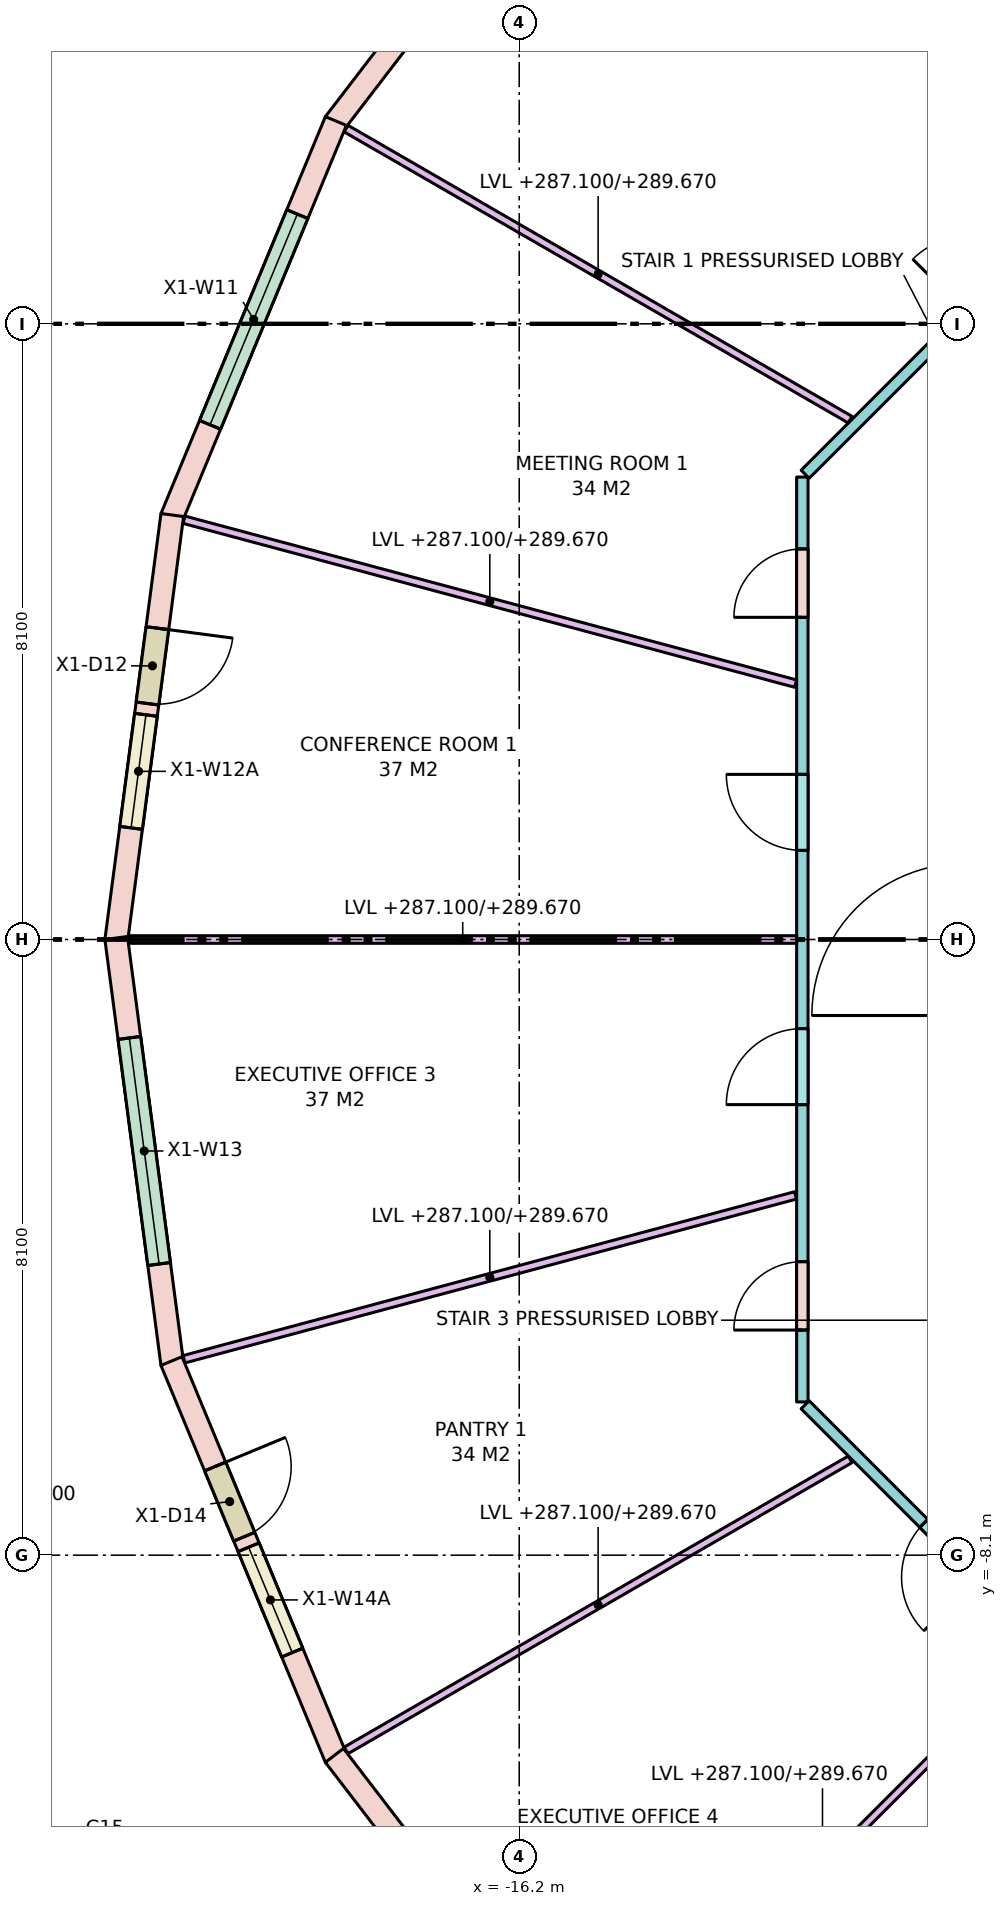
"""IFC4 building model, lengths in metres.
Left out: names, types, materials, properties, quantities, classifications, styles, units other than length and angle.
Written with IfcOpenShell. Run it as: python <this file> out.ifc"""

import sys

from ifc_helpers import new_model, si_unit, direction, frame, frame_2d, origin, place, context, subcontext, project, spatial, rectangle, extrude, element, fill, save


model = new_model("IFC4")
c1 = context("Model", 3, precision=1e-05, world=origin(), true_north=direction((0.0, 1.0)))
c2 = subcontext(c1, "Body", "Model", "MODEL_VIEW")
j1 = project(units=[si_unit("LENGTHUNIT", "METRE"), si_unit("PLANEANGLEUNIT", "RADIAN")], contexts=[c1])
p1 = place(None, origin())
s1 = spatial("IfcSite", under=j1, at=p1, CompositionType="ELEMENT")
p2 = place(p1, origin())
s2 = spatial("IfcBuilding", under=s1, at=p2, CompositionType="ELEMENT")
p3 = place(p2, frame((0.0, 0.0, 287.1)))
s3 = spatial("IfcBuildingStorey", under=s2, at=p3, CompositionType="ELEMENT", Elevation=287.1)
p4 = place(p3, frame((-15.191, 15.219, 0.0), z_axis=(0.0, 0.0, 1.0), x_axis=(-0.608747976925, -0.793363662257, 0.0)))
e1 = element("IfcWall", 1, at=p4, inside=s3, PredefinedType="STANDARD", context=c2, shape_type="SweptSolid", body=[
    extrude(rectangle(XDim=5.652, YDim=0.3, at=frame_2d((2.826, 0.0))), origin(), (0.0, 0.0, 1.0), 3.42),
])
p5 = place(p4, frame((1.501, 0.0, 0.0)))
e2 = element("IfcOpeningElement", 2, at=p5, cuts=e1, PredefinedType="OPENING", context=c2, shape_type="SweptSolid", body=[
    extrude(rectangle(XDim=1.0, YDim=2.4, at=frame_2d((0.5, 1.2))), frame((0.0, 0.16, 0.0), z_axis=(0.0, -1.0, 0.0), x_axis=(1.0, 0.0, 0.0)), (0.0, 0.0, 1.0), 0.32),
])
p6 = place(p4, frame((2.651, 0.0, 0.8)))
e3 = element("IfcOpeningElement", 3, at=p6, cuts=e1, PredefinedType="OPENING", context=c2, shape_type="SweptSolid", body=[
    extrude(rectangle(XDim=1.5, YDim=2.4, at=frame_2d((0.75, 1.2))), frame((0.0, 0.16, 0.0), z_axis=(0.0, -1.0, 0.0), x_axis=(1.0, 0.0, 0.0)), (0.0, 0.0, 1.0), 0.32),
])
p7 = place(p3, frame((-18.612, 10.768, 0.0), z_axis=(0.0, 0.0, 1.0), x_axis=(-0.382660798975, -0.923888907244, 0.0)))
e4 = element("IfcWall", 4, at=p7, inside=s3, PredefinedType="STANDARD", context=c2, shape_type="SweptSolid", body=[
    extrude(rectangle(XDim=5.652, YDim=0.3, at=frame_2d((2.826, 0.0))), origin(), (0.0, 0.0, 1.0), 3.42),
])
p8 = place(p7, frame((1.326, 0.0, 0.8)))
e5 = element("IfcOpeningElement", 5, at=p8, cuts=e4, PredefinedType="OPENING", context=c2, shape_type="SweptSolid", body=[
    extrude(rectangle(XDim=3.0, YDim=2.4, at=frame_2d((1.5, 1.2))), frame((0.0, 0.16, 0.0), z_axis=(0.0, -1.0, 0.0), x_axis=(1.0, 0.0, 0.0)), (0.0, 0.0, 1.0), 0.32),
])
p9 = place(p3, frame((-20.765, 5.584, 0.0), z_axis=(0.0, 0.0, 1.0), x_axis=(-0.130533844229, -0.991443853938, 0.0)))
e6 = element("IfcWall", 6, at=p9, inside=s3, PredefinedType="STANDARD", context=c2, shape_type="SweptSolid", body=[
    extrude(rectangle(XDim=5.652, YDim=0.3, at=frame_2d((2.826, 0.0))), origin(), (0.0, 0.0, 1.0), 3.42),
])
p10 = place(p9, frame((1.501, 0.0, 0.0)))
e7 = element("IfcOpeningElement", 7, at=p10, cuts=e6, PredefinedType="OPENING", context=c2, shape_type="SweptSolid", body=[
    extrude(rectangle(XDim=1.0, YDim=2.4, at=frame_2d((0.5, 1.2))), frame((0.0, 0.16, 0.0), z_axis=(0.0, -1.0, 0.0), x_axis=(1.0, 0.0, 0.0)), (0.0, 0.0, 1.0), 0.32),
])
p11 = place(p9, frame((2.651, 0.0, 0.8)))
e8 = element("IfcOpeningElement", 8, at=p11, cuts=e6, PredefinedType="OPENING", context=c2, shape_type="SweptSolid", body=[
    extrude(rectangle(XDim=1.5, YDim=2.4, at=frame_2d((0.75, 1.2))), frame((0.0, 0.16, 0.0), z_axis=(0.0, -1.0, 0.0), x_axis=(1.0, 0.0, 0.0)), (0.0, 0.0, 1.0), 0.32),
])
p12 = place(p3, frame((-21.503, 0.02, 0.0), z_axis=(0.0, 0.0, 1.0), x_axis=(0.130533844229, -0.991443853938, 0.0)))
e9 = element("IfcWall", 9, at=p12, inside=s3, PredefinedType="STANDARD", context=c2, shape_type="SweptSolid", body=[
    extrude(rectangle(XDim=5.652, YDim=0.3, at=frame_2d((2.826, 0.0))), origin(), (0.0, 0.0, 1.0), 3.42),
])
p13 = place(p12, frame((1.326, 0.0, 0.8)))
e10 = element("IfcOpeningElement", 10, at=p13, cuts=e9, PredefinedType="OPENING", context=c2, shape_type="SweptSolid", body=[
    extrude(rectangle(XDim=3.0, YDim=2.4, at=frame_2d((1.5, 1.2))), frame((0.0, 0.16, 0.0), z_axis=(0.0, -1.0, 0.0), x_axis=(1.0, 0.0, 0.0)), (0.0, 0.0, 1.0), 0.32),
])
p14 = place(p3, frame((-20.775, -5.546, 0.0), z_axis=(0.0, 0.0, 1.0), x_axis=(0.382660798975, -0.923888907244, 0.0)))
e11 = element("IfcWall", 11, at=p14, inside=s3, PredefinedType="STANDARD", context=c2, shape_type="SweptSolid", body=[
    extrude(rectangle(XDim=5.652, YDim=0.3, at=frame_2d((2.826, 0.0))), origin(), (0.0, 0.0, 1.0), 3.42),
])
p15 = place(p14, frame((1.501, 0.0, 0.0)))
e12 = element("IfcOpeningElement", 12, at=p15, cuts=e11, PredefinedType="OPENING", context=c2, shape_type="SweptSolid", body=[
    extrude(rectangle(XDim=1.0, YDim=2.4, at=frame_2d((0.5, 1.2))), frame((0.0, 0.16, 0.0), z_axis=(0.0, -1.0, 0.0), x_axis=(1.0, 0.0, 0.0)), (0.0, 0.0, 1.0), 0.32),
])
p16 = place(p14, frame((2.651, 0.0, 0.8)))
e13 = element("IfcOpeningElement", 13, at=p16, cuts=e11, PredefinedType="OPENING", context=c2, shape_type="SweptSolid", body=[
    extrude(rectangle(XDim=1.5, YDim=2.4, at=frame_2d((0.75, 1.2))), frame((0.0, 0.16, 0.0), z_axis=(0.0, -1.0, 0.0), x_axis=(1.0, 0.0, 0.0)), (0.0, 0.0, 1.0), 0.32),
])
p17 = place(p3, frame((-18.632, -10.734, 0.0), z_axis=(0.0, 0.0, 1.0), x_axis=(0.608747976925, -0.793363662257, 0.0)))
e14 = element("IfcWall", 14, at=p17, inside=s3, PredefinedType="STANDARD", context=c2, shape_type="SweptSolid", body=[
    extrude(rectangle(XDim=5.652, YDim=0.3, at=frame_2d((2.826, 0.0))), origin(), (0.0, 0.0, 1.0), 3.42),
])
p18 = place(p17, frame((1.326, 0.0, 0.8)))
e15 = element("IfcOpeningElement", 15, at=p18, cuts=e14, PredefinedType="OPENING", context=c2, shape_type="SweptSolid", body=[
    extrude(rectangle(XDim=3.0, YDim=2.4, at=frame_2d((1.5, 1.2))), frame((0.0, 0.16, 0.0), z_axis=(0.0, -1.0, 0.0), x_axis=(1.0, 0.0, 0.0)), (0.0, 0.0, 1.0), 0.32),
])
p19 = place(p3, frame((-8.121, -10.438, 0.0), z_axis=(0.0, 0.0, 1.0), x_axis=(-0.707106781187, 0.707106781187, 0.0)))
e16 = element("IfcWall", 16, at=p19, inside=s3, PredefinedType="PARTITIONING", context=c2, shape_type="SweptSolid", body=[
    extrude(rectangle(XDim=6.105, YDim=0.15, at=frame_2d((3.053, 0.0))), origin(), (0.0, 0.0, 1.0), 2.57),
])
p20 = place(p19, frame((2.897, 0.0, 0.0)))
e17 = element("IfcOpeningElement", 17, at=p20, cuts=e16, PredefinedType="OPENING", context=c2, shape_type="SweptSolid", body=[
    extrude(rectangle(XDim=1.0, YDim=2.1, at=frame_2d((0.5, 1.05))), frame((0.0, 0.085, 0.0), z_axis=(0.0, -1.0, 0.0), x_axis=(1.0, 0.0, 0.0)), (0.0, 0.0, 1.0), 0.17),
])
p21 = place(p19, frame((0.394, 0.0, 0.0)))
e18 = element("IfcOpeningElement", 18, at=p21, cuts=e16, PredefinedType="OPENING", context=c2, shape_type="SweptSolid", body=[
    extrude(rectangle(XDim=0.9, YDim=2.1, at=frame_2d((0.45, 1.05))), frame((0.0, 0.085, 0.0), z_axis=(0.0, -1.0, 0.0), x_axis=(1.0, 0.0, 0.0)), (0.0, 0.0, 1.0), 0.17),
])
p22 = place(p3, frame((-12.475, -6.084, 0.0), z_axis=(0.0, 0.0, 1.0), x_axis=(0.0, 1.0, 0.0)))
e19 = element("IfcWall", 19, at=p22, inside=s3, PredefinedType="PARTITIONING", context=c2, shape_type="SweptSolid", body=[
    extrude(rectangle(XDim=12.167, YDim=0.15, at=frame_2d((6.084, 0.0))), origin(), (0.0, 0.0, 1.0), 2.57),
])
p23 = place(p22, frame((10.322, 0.0, 0.0)))
e20 = element("IfcOpeningElement", 20, at=p23, cuts=e19, PredefinedType="OPENING", context=c2, shape_type="SweptSolid", body=[
    extrude(rectangle(XDim=0.9, YDim=2.1, at=frame_2d((0.45, 1.05))), frame((0.0, 0.085, 0.0), z_axis=(0.0, -1.0, 0.0), x_axis=(1.0, 0.0, 0.0)), (0.0, 0.0, 1.0), 0.17),
])
p24 = place(p22, frame((7.256, 0.0, 0.0)))
e21 = element("IfcOpeningElement", 21, at=p24, cuts=e19, PredefinedType="OPENING", context=c2, shape_type="SweptSolid", body=[
    extrude(rectangle(XDim=1.0, YDim=2.1, at=frame_2d((0.5, 1.05))), frame((0.0, 0.085, 0.0), z_axis=(0.0, -1.0, 0.0), x_axis=(1.0, 0.0, 0.0)), (0.0, 0.0, 1.0), 0.17),
])
p25 = place(p22, frame((3.912, 0.0, 0.0)))
e22 = element("IfcOpeningElement", 22, at=p25, cuts=e19, PredefinedType="OPENING", context=c2, shape_type="SweptSolid", body=[
    extrude(rectangle(XDim=1.0, YDim=2.1, at=frame_2d((0.5, 1.05))), frame((0.0, 0.085, 0.0), z_axis=(0.0, -1.0, 0.0), x_axis=(1.0, 0.0, 0.0)), (0.0, 0.0, 1.0), 0.17),
])
p26 = place(p22, frame((0.946, 0.0, 0.0)))
e23 = element("IfcOpeningElement", 23, at=p26, cuts=e19, PredefinedType="OPENING", context=c2, shape_type="SweptSolid", body=[
    extrude(rectangle(XDim=0.9, YDim=2.1, at=frame_2d((0.45, 1.05))), frame((0.0, 0.085, 0.0), z_axis=(0.0, -1.0, 0.0), x_axis=(1.0, 0.0, 0.0)), (0.0, 0.0, 1.0), 0.17),
])
p27 = place(p3, frame((-12.438, 6.121, 0.0), z_axis=(0.0, 0.0, 1.0), x_axis=(0.707106781187, 0.707106781187, 0.0)))
e24 = element("IfcWall", 24, at=p27, inside=s3, PredefinedType="PARTITIONING", context=c2, shape_type="SweptSolid", body=[
    extrude(rectangle(XDim=6.105, YDim=0.15, at=frame_2d((3.053, 0.0))), origin(), (0.0, 0.0, 1.0), 2.57),
])
p28 = place(p27, frame((3.002, 0.0, 0.0)))
e25 = element("IfcOpeningElement", 25, at=p28, cuts=e24, PredefinedType="OPENING", context=c2, shape_type="SweptSolid", body=[
    extrude(rectangle(XDim=1.0, YDim=2.1, at=frame_2d((0.5, 1.05))), frame((0.0, 0.085, 0.0), z_axis=(0.0, -1.0, 0.0), x_axis=(1.0, 0.0, 0.0)), (0.0, 0.0, 1.0), 0.17),
])
p29 = place(p3, frame((-11.846, 6.839, 0.0), z_axis=(0.0, 0.0, 1.0), x_axis=(-0.866007734672, 0.500030602552, 0.0)))
e26 = element("IfcWall", 26, at=p29, inside=s3, PredefinedType="PARTITIONING", context=c2, shape_type="SweptSolid", body=[
    extrude(rectangle(XDim=7.658, YDim=0.1, at=frame_2d((3.829, 0.0))), origin(), (0.0, 0.0, 1.0), 2.57),
])
p30 = place(p3, frame((-12.564, 3.367, 0.0), z_axis=(0.0, 0.0, 1.0), x_axis=(-0.965933136847, 0.258791760188, 0.0)))
e27 = element("IfcWall", 27, at=p30, inside=s3, PredefinedType="PARTITIONING", context=c2, shape_type="SweptSolid", body=[
    extrude(rectangle(XDim=8.329, YDim=0.1, at=frame_2d((4.165, 0.0))), origin(), (0.0, 0.0, 1.0), 2.57),
])
p31 = place(p3, frame((-12.55, 0.0, 0.0), z_axis=(0.0, 0.0, 1.0), x_axis=(-1.0, 0.0, 0.0)))
e28 = element("IfcWall", 28, at=p31, inside=s3, PredefinedType="PARTITIONING", context=c2, shape_type="SweptSolid", body=[
    extrude(rectangle(XDim=8.787, YDim=0.1, at=frame_2d((4.393, 0.0))), origin(), (0.0, 0.0, 1.0), 2.57),
])
p32 = place(p3, frame((-12.564, -3.367, 0.0), z_axis=(0.0, 0.0, 1.0), x_axis=(-0.965933136847, -0.258791760188, 0.0)))
e29 = element("IfcWall", 29, at=p32, inside=s3, PredefinedType="PARTITIONING", context=c2, shape_type="SweptSolid", body=[
    extrude(rectangle(XDim=8.329, YDim=0.1, at=frame_2d((4.165, 0.0))), origin(), (0.0, 0.0, 1.0), 2.57),
])
p33 = place(p3, frame((-11.846, -6.839, 0.0), z_axis=(0.0, 0.0, 1.0), x_axis=(-0.866007734672, -0.500030602552, 0.0)))
e30 = element("IfcWall", 30, at=p33, inside=s3, PredefinedType="PARTITIONING", context=c2, shape_type="SweptSolid", body=[
    extrude(rectangle(XDim=7.658, YDim=0.1, at=frame_2d((3.829, 0.0))), origin(), (0.0, 0.0, 1.0), 2.57),
])
p34 = place(p3, frame((-9.333, -9.333, 0.0), z_axis=(0.0, 0.0, 1.0), x_axis=(-0.707106781187, -0.707106781187, 0.0)))
e31 = element("IfcWall", 31, at=p34, inside=s3, PredefinedType="PARTITIONING", context=c2, shape_type="SweptSolid", body=[
    extrude(rectangle(XDim=8.139, YDim=0.1, at=frame_2d((4.069, 0.0))), origin(), (0.0, 0.0, 1.0), 2.57),
])
p35 = place(p8, origin())
e32 = element("IfcWindow", 32, at=p35, inside=s3, PartitioningType="SINGLE_PANEL", PredefinedType="WINDOW", context=c2, shape_type="SweptSolid", body=[
    extrude(rectangle(XDim=3.0, YDim=2.4, at=frame_2d((1.5, 1.2))), frame((0.0, 0.03, 0.0), z_axis=(0.0, -1.0, 0.0), x_axis=(1.0, 0.0, 0.0)), (0.0, 0.0, 1.0), 0.06),
])
fill(e5, e32)
p36 = place(p10, origin())
e33 = element("IfcDoor", 33, at=p36, inside=s3, OperationType="SINGLE_SWING_LEFT", PredefinedType="DOOR", context=c2, shape_type="SweptSolid", body=[
    extrude(rectangle(XDim=1.0, YDim=2.4, at=frame_2d((0.5, 1.2))), frame((0.0, 0.025, 0.0), z_axis=(0.0, -1.0, 0.0), x_axis=(1.0, 0.0, 0.0)), (0.0, 0.0, 1.0), 0.05),
])
fill(e7, e33)
p37 = place(p11, origin())
e34 = element("IfcWindow", 34, at=p37, inside=s3, PartitioningType="SINGLE_PANEL", PredefinedType="WINDOW", context=c2, shape_type="SweptSolid", body=[
    extrude(rectangle(XDim=1.5, YDim=2.4, at=frame_2d((0.75, 1.2))), frame((0.0, 0.03, 0.0), z_axis=(0.0, -1.0, 0.0), x_axis=(1.0, 0.0, 0.0)), (0.0, 0.0, 1.0), 0.06),
])
fill(e8, e34)
p38 = place(p13, origin())
e35 = element("IfcWindow", 35, at=p38, inside=s3, PartitioningType="SINGLE_PANEL", PredefinedType="WINDOW", context=c2, shape_type="SweptSolid", body=[
    extrude(rectangle(XDim=3.0, YDim=2.4, at=frame_2d((1.5, 1.2))), frame((0.0, 0.03, 0.0), z_axis=(0.0, -1.0, 0.0), x_axis=(1.0, 0.0, 0.0)), (0.0, 0.0, 1.0), 0.06),
])
fill(e10, e35)
p39 = place(p15, origin())
e36 = element("IfcDoor", 36, at=p39, inside=s3, OperationType="SINGLE_SWING_LEFT", PredefinedType="DOOR", context=c2, shape_type="SweptSolid", body=[
    extrude(rectangle(XDim=1.0, YDim=2.4, at=frame_2d((0.5, 1.2))), frame((0.0, 0.025, 0.0), z_axis=(0.0, -1.0, 0.0), x_axis=(1.0, 0.0, 0.0)), (0.0, 0.0, 1.0), 0.05),
])
fill(e12, e36)
p40 = place(p16, origin())
e37 = element("IfcWindow", 37, at=p40, inside=s3, PartitioningType="SINGLE_PANEL", PredefinedType="WINDOW", context=c2, shape_type="SweptSolid", body=[
    extrude(rectangle(XDim=1.5, YDim=2.4, at=frame_2d((0.75, 1.2))), frame((0.0, 0.03, 0.0), z_axis=(0.0, -1.0, 0.0), x_axis=(1.0, 0.0, 0.0)), (0.0, 0.0, 1.0), 0.06),
])
fill(e13, e37)
p41 = place(p23, origin())
e38 = element("IfcDoor", 38, at=p41, inside=s3, OperationType="SINGLE_SWING_LEFT", PredefinedType="DOOR", context=c2, shape_type="SweptSolid", body=[
    extrude(rectangle(XDim=0.9, YDim=2.1, at=frame_2d((0.45, 1.05))), frame((0.0, 0.025, 0.0), z_axis=(0.0, -1.0, 0.0), x_axis=(1.0, 0.0, 0.0)), (0.0, 0.0, 1.0), 0.05),
])
fill(e20, e38)
p42 = place(p24, origin())
e39 = element("IfcDoor", 39, at=p42, inside=s3, OperationType="SINGLE_SWING_RIGHT", PredefinedType="DOOR", context=c2, shape_type="SweptSolid", body=[
    extrude(rectangle(XDim=1.0, YDim=2.1, at=frame_2d((0.5, 1.05))), frame((0.0, 0.025, 0.0), z_axis=(0.0, -1.0, 0.0), x_axis=(1.0, 0.0, 0.0)), (0.0, 0.0, 1.0), 0.05),
])
fill(e21, e39)
p43 = place(p25, origin())
e40 = element("IfcDoor", 40, at=p43, inside=s3, OperationType="SINGLE_SWING_LEFT", PredefinedType="DOOR", context=c2, shape_type="SweptSolid", body=[
    extrude(rectangle(XDim=1.0, YDim=2.1, at=frame_2d((0.5, 1.05))), frame((0.0, 0.025, 0.0), z_axis=(0.0, -1.0, 0.0), x_axis=(1.0, 0.0, 0.0)), (0.0, 0.0, 1.0), 0.05),
])
fill(e22, e40)
p44 = place(p26, origin())
e41 = element("IfcDoor", 41, at=p44, inside=s3, OperationType="SINGLE_SWING_LEFT", PredefinedType="DOOR", context=c2, shape_type="SweptSolid", body=[
    extrude(rectangle(XDim=0.9, YDim=2.1, at=frame_2d((0.45, 1.05))), frame((0.0, 0.025, 0.0), z_axis=(0.0, -1.0, 0.0), x_axis=(1.0, 0.0, 0.0)), (0.0, 0.0, 1.0), 0.05),
])
fill(e23, e41)
p45 = place(p20, origin())
e42 = element("IfcDoor", 42, at=p45, inside=s3, OperationType="SINGLE_SWING_LEFT", PredefinedType="DOOR", context=c2, shape_type="SweptSolid", body=[
    extrude(rectangle(XDim=1.0, YDim=2.1, at=frame_2d((0.5, 1.05))), frame((0.0, 0.025, 0.0), z_axis=(0.0, -1.0, 0.0), x_axis=(1.0, 0.0, 0.0)), (0.0, 0.0, 1.0), 0.05),
])
fill(e17, e42)
save(model, sys.argv[1])
